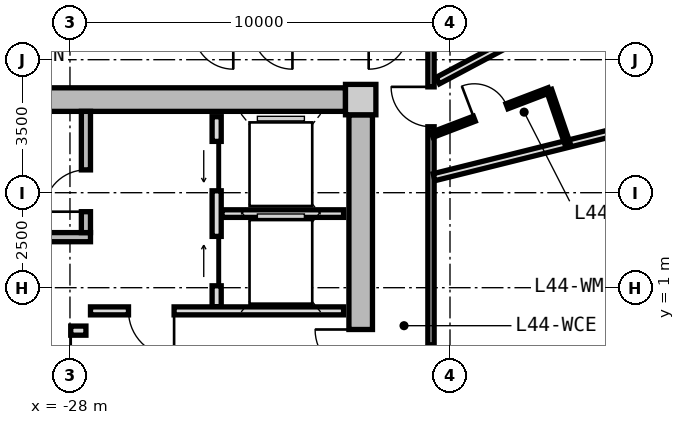
"""IFC4 building model, lengths in metres.
Left out: names, types, materials, properties, quantities, classifications, styles, units other than length and angle.
Written with IfcOpenShell. Run it as: python <this file> out.ifc"""

import sys

from ifc_helpers import new_model, si_unit, direction, frame, frame_2d, origin, origin_2d, place, context, subcontext, project, spatial, rectangle, extrude, source, transform, mapped, element, fill, save


model = new_model("IFC4")
c1 = context("Model", 3, precision=1e-05, world=origin(), true_north=direction((0.0, 1.0)))
c2 = subcontext(c1, "Body", "Model", "MODEL_VIEW")
j1 = project(units=[si_unit("LENGTHUNIT", "METRE"), si_unit("PLANEANGLEUNIT", "RADIAN")], contexts=[c1])
p1 = place(None, origin())
s1 = spatial("IfcSite", under=j1, at=p1, CompositionType="ELEMENT")
p2 = place(p1, origin())
s2 = spatial("IfcBuilding", under=s1, at=p2, CompositionType="ELEMENT")
p3 = place(p2, frame((0.0, 0.0, 143.45)))
s3 = spatial("IfcBuildingStorey", under=s2, at=p3, CompositionType="ELEMENT", Elevation=143.45)
m1 = source(origin(), c2, "Body", "SweptSolid", [
    extrude(rectangle(XDim=0.8, YDim=0.8, at=origin_2d()), origin(), (0.0, 0.0, 1.0), 3.05),
])
p4 = place(p3, frame((-20.35, 5.95, 0.0), z_axis=(0.0, 0.0, 1.0), x_axis=(1.0, 0.0, 0.0)))
e1 = element("IfcColumn", 1, at=p4, inside=s3, PredefinedType="COLUMN", context=c2, shape_type="MappedRepresentation", body=[
    mapped(m1, transform((0.0, 0.0, 0.0), x_axis=(1.0, 0.0, 0.0), y_axis=(0.0, 1.0, 0.0), z_axis=(0.0, 0.0, 1.0), scale=1.0)),
])
m2 = source(origin(), c2, "Body", "SweptSolid", [
    extrude(rectangle(XDim=14.5, YDim=0.62, at=frame_2d((7.25, 0.0))), origin(), (0.0, 0.0, 1.0), 2.81),
])
p5 = place(p3, frame((-35.25, 5.95, 0.0), z_axis=(0.0, 0.0, 1.0), x_axis=(1.0, 0.0, 0.0)))
e2 = element("IfcWall", 2, at=p5, inside=s3, PredefinedType="SHEAR", context=c2, shape_type="MappedRepresentation", body=[
    mapped(m2, transform((0.0, 0.0, 0.0), x_axis=(1.0, 0.0, 0.0), y_axis=(0.0, 1.0, 0.0), z_axis=(0.0, 0.0, 1.0), scale=1.0)),
])
m3 = source(origin(), c2, "Body", "SweptSolid", [
    extrude(rectangle(XDim=11.1, YDim=0.62, at=frame_2d((5.55, 0.0))), origin(), (0.0, 0.0, 1.0), 2.81),
])
p6 = place(p3, frame((-20.35, 5.55, 0.0), z_axis=(0.0, 0.0, 1.0), x_axis=(0.0, -1.0, 0.0)))
e3 = element("IfcWall", 3, at=p6, inside=s3, PredefinedType="SHEAR", context=c2, shape_type="MappedRepresentation", body=[
    mapped(m3, transform((0.0, 0.0, 0.0), x_axis=(1.0, 0.0, 0.0), y_axis=(0.0, 1.0, 0.0), z_axis=(0.0, 0.0, 1.0), scale=1.0)),
])
p7 = place(p6, frame((5.65, 0.0, 0.0)))
e4 = element("IfcOpeningElement", 4, at=p7, cuts=e3, PredefinedType="OPENING", context=c2, shape_type="SweptSolid", body=[
    extrude(rectangle(XDim=1.2, YDim=2.15, at=frame_2d((0.6, 1.075))), frame((0.0, 0.32, 0.0), z_axis=(0.0, -1.0, 0.0), x_axis=(1.0, 0.0, 0.0)), (0.0, 0.0, 1.0), 0.64),
])
m4 = source(origin(), c2, "Body", "SweptSolid", [
    extrude(rectangle(XDim=8.431, YDim=0.29, at=frame_2d((4.216, 0.0))), origin(), (0.0, 0.0, 1.0), 2.81),
])
p8 = place(p3, frame((-14.827, 13.075, 0.0), z_axis=(0.0, 0.0, 1.0), x_axis=(0.527377998418, -0.849630770855, 0.0)))
e5 = element("IfcWall", 5, at=p8, inside=s3, PredefinedType="SOLIDWALL", context=c2, shape_type="MappedRepresentation", body=[
    mapped(m4, transform((0.0, 0.0, 0.0), x_axis=(1.0, 0.0, 0.0), y_axis=(0.0, 1.0, 0.0), z_axis=(0.0, 0.0, 1.0), scale=1.0)),
])
p9 = place(p8, frame((5.78, 0.0, 0.0)))
e6 = element("IfcOpeningElement", 6, at=p9, cuts=e5, PredefinedType="OPENING", context=c2, shape_type="SweptSolid", body=[
    extrude(rectangle(XDim=1.15, YDim=2.25, at=frame_2d((0.575, 1.125))), frame((0.0, 0.155, 0.0), z_axis=(0.0, -1.0, 0.0), x_axis=(1.0, 0.0, 0.0)), (0.0, 0.0, 1.0), 0.31),
])
p10 = place(p8, frame((0.85, 0.0, 0.85)))
e7 = element("IfcOpeningElement", 7, at=p10, cuts=e5, PredefinedType="OPENING", context=c2, shape_type="SweptSolid", body=[
    extrude(rectangle(XDim=1.2, YDim=1.5, at=frame_2d((0.6, 0.75))), frame((0.0, 0.155, 0.0), z_axis=(0.0, -1.0, 0.0), x_axis=(1.0, 0.0, 0.0)), (0.0, 0.0, 1.0), 0.31),
])
m5 = source(origin(), c2, "Body", "SweptSolid", [
    extrude(rectangle(XDim=7.88, YDim=0.24, at=frame_2d((3.94, 0.0))), origin(), (0.0, 0.0, 1.0), 2.81),
])
p11 = place(p3, frame((-35.34, 2.33, 0.0), z_axis=(0.0, 0.0, 1.0), x_axis=(1.0, 0.0, 0.0)))
e8 = element("IfcWall", 8, at=p11, inside=s3, PredefinedType="PARTITIONING", context=c2, shape_type="MappedRepresentation", body=[
    mapped(m5, transform((0.0, 0.0, 0.0), x_axis=(1.0, 0.0, 0.0), y_axis=(0.0, 1.0, 0.0), z_axis=(0.0, 0.0, 1.0), scale=1.0)),
])
m6 = source(origin(), c2, "Body", "SweptSolid", [
    extrude(rectangle(XDim=3.19, YDim=0.24, at=frame_2d((1.595, 0.0))), origin(), (0.0, 0.0, 1.0), 2.81),
])
p12 = place(p3, frame((-27.58, 2.45, 0.0), z_axis=(0.0, 0.0, 1.0), x_axis=(0.0, 1.0, 0.0)))
e9 = element("IfcWall", 9, at=p12, inside=s3, PredefinedType="PARTITIONING", context=c2, shape_type="MappedRepresentation", body=[
    mapped(m6, transform((0.0, 0.0, 0.0), x_axis=(1.0, 0.0, 0.0), y_axis=(0.0, 1.0, 0.0), z_axis=(0.0, 0.0, 1.0), scale=1.0)),
])
p13 = place(p12, frame((0.55, 0.0, 0.0)))
e10 = element("IfcOpeningElement", 10, at=p13, cuts=e9, PredefinedType="OPENING", context=c2, shape_type="SweptSolid", body=[
    extrude(rectangle(XDim=1.1, YDim=2.15, at=frame_2d((0.55, 1.075))), frame((0.0, 0.13, 0.0), z_axis=(0.0, -1.0, 0.0), x_axis=(1.0, 0.0, 0.0)), (0.0, 0.0, 1.0), 0.26),
])
m7 = source(origin(), c2, "Body", "SweptSolid", [
    extrude(rectangle(XDim=5.0, YDim=0.24, at=frame_2d((2.5, 0.0))), origin(), (0.0, 0.0, 1.0), 2.795),
])
p14 = place(p3, frame((-24.14, 0.5, 0.0), z_axis=(0.0, 0.0, 1.0), x_axis=(0.0, 1.0, 0.0)))
e11 = element("IfcWall", 11, at=p14, inside=s3, PredefinedType="PARTITIONING", context=c2, shape_type="MappedRepresentation", body=[
    mapped(m7, transform((0.0, 0.0, 0.0), x_axis=(1.0, 0.0, 0.0), y_axis=(0.0, 1.0, 0.0), z_axis=(0.0, 0.0, 1.0), scale=1.0)),
])
p15 = place(p14, frame((3.05, 0.0, 0.0)))
e12 = element("IfcOpeningElement", 12, at=p15, cuts=e11, PredefinedType="OPENING", context=c2, shape_type="SweptSolid", body=[
    extrude(rectangle(XDim=1.3, YDim=2.2, at=frame_2d((0.65, 1.1))), frame((0.0, 0.13, 0.0), z_axis=(0.0, -1.0, 0.0), x_axis=(1.0, 0.0, 0.0)), (0.0, 0.0, 1.0), 0.26),
])
p16 = place(p14, frame((0.55, 0.0, 0.0)))
e13 = element("IfcOpeningElement", 13, at=p16, cuts=e11, PredefinedType="OPENING", context=c2, shape_type="SweptSolid", body=[
    extrude(rectangle(XDim=1.3, YDim=2.2, at=frame_2d((0.65, 1.1))), frame((0.0, 0.13, 0.0), z_axis=(0.0, -1.0, 0.0), x_axis=(1.0, 0.0, 0.0)), (0.0, 0.0, 1.0), 0.26),
])
m8 = source(origin(), c2, "Body", "SweptSolid", [
    extrude(rectangle(XDim=3.2, YDim=0.2, at=frame_2d((1.6, 0.0))), origin(), (0.0, 0.0, 1.0), 2.795),
])
p17 = place(p3, frame((-24.0, 2.95, 0.0), z_axis=(0.0, 0.0, 1.0), x_axis=(1.0, 0.0, 0.0)))
e14 = element("IfcWall", 14, at=p17, inside=s3, PredefinedType="PARTITIONING", context=c2, shape_type="MappedRepresentation", body=[
    mapped(m8, transform((0.0, 0.0, 0.0), x_axis=(1.0, 0.0, 0.0), y_axis=(0.0, 1.0, 0.0), z_axis=(0.0, 0.0, 1.0), scale=1.0)),
])
m9 = source(origin(), c2, "Body", "SweptSolid", [
    extrude(rectangle(XDim=6.66, YDim=0.21, at=frame_2d((3.33, 0.0))), origin(), (0.0, 0.0, 1.0), 2.795),
])
p18 = place(p3, frame((-27.46, 0.39, 0.0), z_axis=(0.0, 0.0, 1.0), x_axis=(1.0, 0.0, 0.0)))
e15 = element("IfcWall", 15, at=p18, inside=s3, PredefinedType="PARTITIONING", context=c2, shape_type="MappedRepresentation", body=[
    mapped(m9, transform((0.0, 0.0, 0.0), x_axis=(1.0, 0.0, 0.0), y_axis=(0.0, 1.0, 0.0), z_axis=(0.0, 0.0, 1.0), scale=1.0)),
])
p19 = place(p18, frame((1.0, 0.0, 0.0)))
e16 = element("IfcOpeningElement", 16, at=p19, cuts=e15, PredefinedType="OPENING", context=c2, shape_type="SweptSolid", body=[
    extrude(rectangle(XDim=1.2, YDim=2.15, at=frame_2d((0.6, 1.075))), frame((0.0, 0.115, 0.0), z_axis=(0.0, -1.0, 0.0), x_axis=(1.0, 0.0, 0.0)), (0.0, 0.0, 1.0), 0.23),
])
m10 = source(origin(), c2, "Body", "SweptSolid", [
    extrude(rectangle(XDim=7.62, YDim=0.24, at=frame_2d((3.81, 0.0))), origin(), (0.0, 0.0, 1.0), 2.795),
])
p20 = place(p3, frame((-35.2, -0.13, 0.0), z_axis=(0.0, 0.0, 1.0), x_axis=(1.0, 0.0, 0.0)))
e17 = element("IfcWall", 17, at=p20, inside=s3, PredefinedType="PARTITIONING", context=c2, shape_type="MappedRepresentation", body=[
    mapped(m10, transform((0.0, 0.0, 0.0), x_axis=(1.0, 0.0, 0.0), y_axis=(0.0, 1.0, 0.0), z_axis=(0.0, 0.0, 1.0), scale=1.0)),
])
p21 = place(p20, frame((6.22, 0.0, 0.0)))
e18 = element("IfcOpeningElement", 18, at=p21, cuts=e17, PredefinedType="OPENING", context=c2, shape_type="SweptSolid", body=[
    extrude(rectangle(XDim=1.0, YDim=2.1, at=frame_2d((0.5, 1.05))), frame((0.0, 0.13, 0.0), z_axis=(0.0, -1.0, 0.0), x_axis=(1.0, 0.0, 0.0)), (0.0, 0.0, 1.0), 0.26),
])
p22 = place(p20, frame((2.4, 0.0, 0.0)))
e19 = element("IfcOpeningElement", 19, at=p22, cuts=e17, PredefinedType="OPENING", context=c2, shape_type="SweptSolid", body=[
    extrude(rectangle(XDim=1.0, YDim=2.1, at=frame_2d((0.5, 1.05))), frame((0.0, 0.13, 0.0), z_axis=(0.0, -1.0, 0.0), x_axis=(1.0, 0.0, 0.0)), (0.0, 0.0, 1.0), 0.26),
])
m11 = source(origin(), c2, "Body", "SweptSolid", [
    extrude(rectangle(XDim=15.6, YDim=0.165, at=frame_2d((7.8, 0.0))), origin(), (0.0, 0.0, 1.0), 2.795),
])
p23 = place(p3, frame((-18.5, 7.8, 0.0), z_axis=(0.0, 0.0, 1.0), x_axis=(0.0, -1.0, 0.0)))
e20 = element("IfcWall", 20, at=p23, inside=s3, PredefinedType="PARTITIONING", context=c2, shape_type="MappedRepresentation", body=[
    mapped(m11, transform((0.0, 0.0, 0.0), x_axis=(1.0, 0.0, 0.0), y_axis=(0.0, 1.0, 0.0), z_axis=(0.0, 0.0, 1.0), scale=1.0)),
])
p24 = place(p23, frame((8.314, 0.0, 0.0)))
e21 = element("IfcOpeningElement", 21, at=p24, cuts=e20, PredefinedType="OPENING", context=c2, shape_type="SweptSolid", body=[
    extrude(rectangle(XDim=1.25, YDim=2.2, at=frame_2d((0.625, 1.1))), frame((0.0, 0.093, 0.0), z_axis=(0.0, -1.0, 0.0), x_axis=(1.0, 0.0, 0.0)), (0.0, 0.0, 1.0), 0.185),
])
p25 = place(p23, frame((1.515, 0.0, 0.0)))
e22 = element("IfcOpeningElement", 22, at=p25, cuts=e20, PredefinedType="OPENING", context=c2, shape_type="SweptSolid", body=[
    extrude(rectangle(XDim=1.05, YDim=2.15, at=frame_2d((0.525, 1.075))), frame((0.0, 0.093, 0.0), z_axis=(0.0, -1.0, 0.0), x_axis=(1.0, 0.0, 0.0)), (0.0, 0.0, 1.0), 0.185),
])
m12 = source(origin(), c2, "Body", "SweptSolid", [
    extrude(rectangle(XDim=8.305, YDim=0.19, at=frame_2d((4.153, 0.0))), origin(), (0.0, 0.0, 1.0), 2.345),
])
p26 = place(p3, frame((-18.42, 3.908, 0.0), z_axis=(0.0, 0.0, 1.0), x_axis=(0.970309994378, 0.241864662175, 0.0)))
e23 = element("IfcWall", 23, at=p26, inside=s3, PredefinedType="PARTITIONING", context=c2, shape_type="MappedRepresentation", body=[
    mapped(m12, transform((0.0, 0.0, 0.0), x_axis=(1.0, 0.0, 0.0), y_axis=(0.0, 1.0, 0.0), z_axis=(0.0, 0.0, 1.0), scale=1.0)),
])
m13 = source(origin(), c2, "Body", "SweptSolid", [
    extrude(rectangle(XDim=6.499, YDim=0.19, at=frame_2d((3.25, 0.0))), origin(), (0.0, 0.0, 1.0), 2.795),
])
p27 = place(p3, frame((-18.324, 6.449, 0.0), z_axis=(0.0, 0.0, 1.0), x_axis=(0.882715595921, 0.469907625729, 0.0)))
e24 = element("IfcWall", 24, at=p27, inside=s3, PredefinedType="PARTITIONING", context=c2, shape_type="MappedRepresentation", body=[
    mapped(m13, transform((0.0, 0.0, 0.0), x_axis=(1.0, 0.0, 0.0), y_axis=(0.0, 1.0, 0.0), z_axis=(0.0, 0.0, 1.0), scale=1.0)),
])
m14 = source(origin(), c2, "Body", "SweptSolid", [
    extrude(rectangle(XDim=3.295, YDim=0.14, at=frame_2d((1.647, 0.0))), origin(), (0.0, 0.0, 1.0), 2.795),
])
p28 = place(p3, frame((-18.47, 5.023, 0.0), z_axis=(0.0, 0.0, 1.0), x_axis=(0.934202224769, 0.356743890258, 0.0)))
e25 = element("IfcWall", 25, at=p28, inside=s3, PredefinedType="PARTITIONING", context=c2, shape_type="MappedRepresentation", body=[
    mapped(m14, transform((0.0, 0.0, 0.0), x_axis=(1.0, 0.0, 0.0), y_axis=(0.0, 1.0, 0.0), z_axis=(0.0, 0.0, 1.0), scale=1.0)),
])
p29 = place(p28, frame((1.188, 0.0, 0.0)))
e26 = element("IfcOpeningElement", 26, at=p29, cuts=e25, PredefinedType="OPENING", context=c2, shape_type="SweptSolid", body=[
    extrude(rectangle(XDim=0.92, YDim=2.1, at=frame_2d((0.46, 1.05))), frame((0.0, 0.08, 0.0), z_axis=(0.0, -1.0, 0.0), x_axis=(1.0, 0.0, 0.0)), (0.0, 0.0, 1.0), 0.16),
])
m15 = source(origin(), c2, "Body", "SweptSolid", [
    extrude(rectangle(XDim=1.479, YDim=0.14, at=frame_2d((0.739, 0.0))), origin(), (0.0, 0.0, 1.0), 2.795),
])
p30 = place(p3, frame((-15.392, 6.198, 0.0), z_axis=(0.0, 0.0, 1.0), x_axis=(0.324438293903, -0.945906862989, 0.0)))
e27 = element("IfcWall", 27, at=p30, inside=s3, PredefinedType="PARTITIONING", context=c2, shape_type="MappedRepresentation", body=[
    mapped(m15, transform((0.0, 0.0, 0.0), x_axis=(1.0, 0.0, 0.0), y_axis=(0.0, 1.0, 0.0), z_axis=(0.0, 0.0, 1.0), scale=1.0)),
])
m16 = source(origin(), c2, "Body", "SweptSolid", [
    extrude(rectangle(XDim=1.1, YDim=2.15, at=frame_2d((0.55, 1.075))), frame((0.0, 0.025, 0.0), z_axis=(0.0, -1.0, 0.0), x_axis=(1.0, 0.0, 0.0)), (0.0, 0.0, 1.0), 0.05),
])
p31 = place(p13, origin())
e28 = element("IfcDoor", 28, at=p31, inside=s3, OperationType="SINGLE_SWING_LEFT", PredefinedType="DOOR", context=c2, shape_type="MappedRepresentation", body=[
    mapped(m16, transform((0.0, 0.0, 0.0), x_axis=(1.0, 0.0, 0.0), y_axis=(0.0, 1.0, 0.0), z_axis=(0.0, 0.0, 1.0), scale=1.0)),
])
fill(e10, e28)
m17 = source(origin(), c2, "Body", "SweptSolid", [
    extrude(rectangle(XDim=1.3, YDim=2.2, at=frame_2d((0.65, 1.1))), frame((0.0, 0.025, 0.0), z_axis=(0.0, -1.0, 0.0), x_axis=(1.0, 0.0, 0.0)), (0.0, 0.0, 1.0), 0.05),
])
p32 = place(p15, origin())
e29 = element("IfcDoor", 29, at=p32, inside=s3, OperationType="SLIDING_TO_LEFT", PredefinedType="DOOR", context=c2, shape_type="MappedRepresentation", body=[
    mapped(m17, transform((0.0, 0.0, 0.0), x_axis=(1.0, 0.0, 0.0), y_axis=(0.0, 1.0, 0.0), z_axis=(0.0, 0.0, 1.0), scale=1.0)),
])
fill(e12, e29)
p33 = place(p16, origin())
e30 = element("IfcDoor", 30, at=p33, inside=s3, OperationType="SLIDING_TO_RIGHT", PredefinedType="DOOR", context=c2, shape_type="MappedRepresentation", body=[
    mapped(m17, transform((0.0, 0.0, 0.0), x_axis=(1.0, 0.0, 0.0), y_axis=(0.0, 1.0, 0.0), z_axis=(0.0, 0.0, 1.0), scale=1.0)),
])
fill(e13, e30)
m18 = source(origin(), c2, "Body", "SweptSolid", [
    extrude(rectangle(XDim=1.2, YDim=2.15, at=frame_2d((0.6, 1.075))), frame((0.0, 0.025, 0.0), z_axis=(0.0, -1.0, 0.0), x_axis=(1.0, 0.0, 0.0)), (0.0, 0.0, 1.0), 0.05),
])
p34 = place(p19, frame((1.2, 0.0, 0.0), z_axis=(0.0, 0.0, 1.0), x_axis=(-1.0, 0.0, 0.0)))
e31 = element("IfcDoor", 31, at=p34, inside=s3, OperationType="SINGLE_SWING_LEFT", PredefinedType="DOOR", context=c2, shape_type="MappedRepresentation", body=[
    mapped(m18, transform((0.0, 0.0, 0.0), x_axis=(1.0, 0.0, 0.0), y_axis=(0.0, 1.0, 0.0), z_axis=(0.0, 0.0, 1.0), scale=1.0)),
])
fill(e16, e31)
p35 = place(p7, frame((1.2, 0.0, 0.0), z_axis=(0.0, 0.0, 1.0), x_axis=(-1.0, 0.0, 0.0)))
e32 = element("IfcDoor", 32, at=p35, inside=s3, OperationType="SINGLE_SWING_RIGHT", PredefinedType="DOOR", context=c2, shape_type="MappedRepresentation", body=[
    mapped(m18, transform((0.0, 0.0, 0.0), x_axis=(1.0, 0.0, 0.0), y_axis=(0.0, 1.0, 0.0), z_axis=(0.0, 0.0, 1.0), scale=1.0)),
])
fill(e4, e32)
m19 = source(origin(), c2, "Body", "SweptSolid", [
    extrude(rectangle(XDim=1.0, YDim=2.1, at=frame_2d((0.5, 1.05))), frame((0.0, 0.025, 0.0), z_axis=(0.0, -1.0, 0.0), x_axis=(1.0, 0.0, 0.0)), (0.0, 0.0, 1.0), 0.05),
])
p36 = place(p21, frame((1.0, 0.0, 0.0), z_axis=(0.0, 0.0, 1.0), x_axis=(-1.0, 0.0, 0.0)))
e33 = element("IfcDoor", 33, at=p36, inside=s3, OperationType="SINGLE_SWING_LEFT", PredefinedType="DOOR", context=c2, shape_type="MappedRepresentation", body=[
    mapped(m19, transform((0.0, 0.0, 0.0), x_axis=(1.0, 0.0, 0.0), y_axis=(0.0, 1.0, 0.0), z_axis=(0.0, 0.0, 1.0), scale=1.0)),
])
fill(e18, e33)
m20 = source(origin(), c2, "Body", "SweptSolid", [
    extrude(rectangle(XDim=1.05, YDim=2.15, at=frame_2d((0.525, 1.075))), frame((0.0, 0.025, 0.0), z_axis=(0.0, -1.0, 0.0), x_axis=(1.0, 0.0, 0.0)), (0.0, 0.0, 1.0), 0.05),
])
p37 = place(p25, frame((1.05, 0.0, 0.0), z_axis=(0.0, 0.0, 1.0), x_axis=(-1.0, 0.0, 0.0)))
e34 = element("IfcDoor", 34, at=p37, inside=s3, OperationType="SINGLE_SWING_RIGHT", PredefinedType="DOOR", context=c2, shape_type="MappedRepresentation", body=[
    mapped(m20, transform((0.0, 0.0, 0.0), x_axis=(1.0, 0.0, 0.0), y_axis=(0.0, 1.0, 0.0), z_axis=(0.0, 0.0, 1.0), scale=1.0)),
])
fill(e22, e34)
m21 = source(origin(), c2, "Body", "SweptSolid", [
    extrude(rectangle(XDim=0.92, YDim=2.1, at=frame_2d((0.46, 1.05))), frame((0.0, 0.025, 0.0), z_axis=(0.0, -1.0, 0.0), x_axis=(1.0, 0.0, 0.0)), (0.0, 0.0, 1.0), 0.05),
])
p38 = place(p29, origin())
e35 = element("IfcDoor", 35, at=p38, inside=s3, OperationType="SINGLE_SWING_LEFT", PredefinedType="DOOR", context=c2, shape_type="MappedRepresentation", body=[
    mapped(m21, transform((0.0, 0.0, 0.0), x_axis=(1.0, 0.0, 0.0), y_axis=(0.0, 1.0, 0.0), z_axis=(0.0, 0.0, 1.0), scale=1.0)),
])
fill(e26, e35)
save(model, sys.argv[1])
